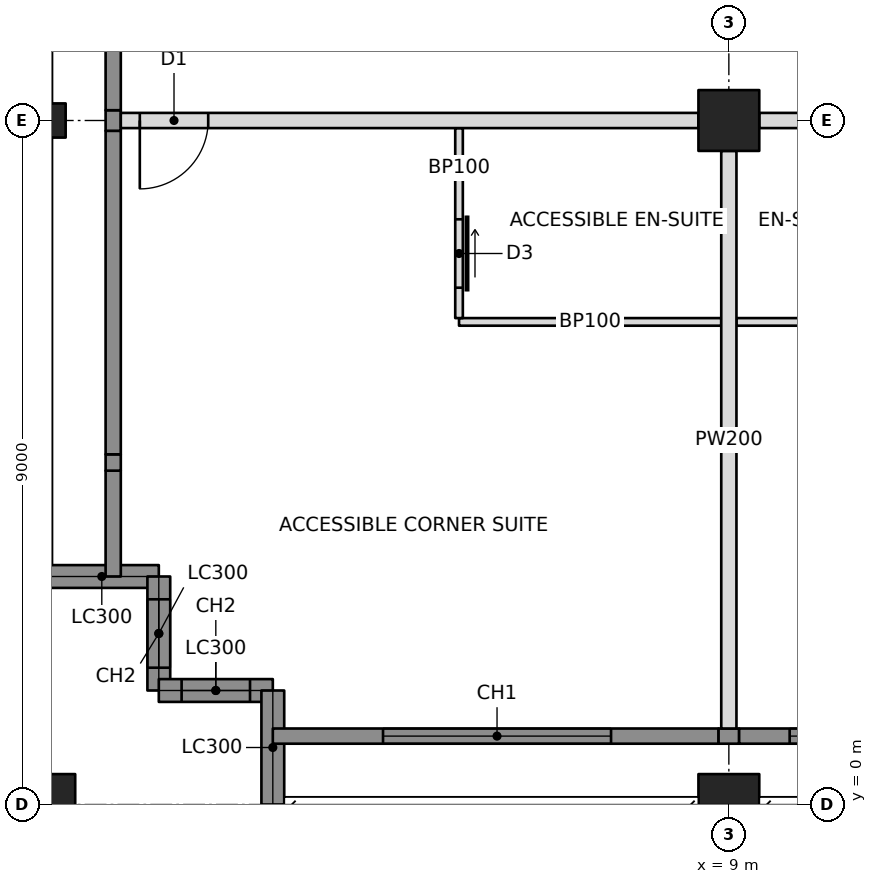
"""IFC4 building model, lengths in metres.
Left out: names, types, materials, properties, quantities, classifications, styles, units other than length and angle.
Written with IfcOpenShell. Run it as: python <this file> out.ifc"""

import sys

from ifc_helpers import new_model, si_unit, direction, frame, frame_2d, origin, origin_with_axes, origin_2d, place, context, subcontext, project, spatial, rectangle, hollow_rectangle, i_section, extrude, element, fill, save


model = new_model("IFC4")
c1 = context("Model", 3, precision=1e-05, world=origin(), true_north=direction((0.0, 1.0)))
c2 = subcontext(c1, "Body", "Model", "MODEL_VIEW")
j1 = project(units=[si_unit("LENGTHUNIT", "METRE"), si_unit("PLANEANGLEUNIT", "RADIAN")], contexts=[c1])
p1 = place(None, origin())
s1 = spatial("IfcSite", under=j1, at=p1, CompositionType="ELEMENT")
p2 = place(p1, origin())
s2 = spatial("IfcBuilding", under=s1, at=p2, CompositionType="ELEMENT")
p3 = place(p2, frame((0.0, 0.0, 191.0)))
s3 = spatial("IfcBuildingStorey", under=s2, at=p3, CompositionType="ELEMENT", Elevation=191.0)
p4 = place(p3, origin_with_axes())
e1 = element("IfcColumn", 1, at=p4, inside=s3, PredefinedType="COLUMN", context=c2, shape_type="SweptSolid", body=[
    extrude(hollow_rectangle(XDim=0.8, YDim=0.8, WallThickness=0.07, at=origin_2d()), origin(), (0.0, 0.0, 1.0), 3.4),
])
p5 = place(p3, frame((0.0, 9.0, 0.0), z_axis=(0.0, 0.0, 1.0), x_axis=(0.0, 1.0, 0.0)))
e2 = element("IfcColumn", 2, at=p5, inside=s3, PredefinedType="COLUMN", context=c2, shape_type="SweptSolid", body=[
    extrude(i_section(OverallWidth=0.449, OverallDepth=0.549, WebThickness=0.072, FlangeThickness=0.115, at=origin_2d()), origin(), (0.0, 0.0, 1.0), 3.4),
])
p6 = place(p3, frame((9.0, 0.0, 0.0), z_axis=(0.0, 0.0, 1.0), x_axis=(1.0, 0.0, 0.0)))
e3 = element("IfcColumn", 3, at=p6, inside=s3, PredefinedType="COLUMN", context=c2, shape_type="SweptSolid", body=[
    extrude(hollow_rectangle(XDim=0.8, YDim=0.8, WallThickness=0.07, at=origin_2d()), origin(), (0.0, 0.0, 1.0), 3.4),
])
p7 = place(p3, frame((9.0, 9.0, 0.0), z_axis=(0.0, 0.0, 1.0), x_axis=(1.0, 0.0, 0.0)))
e4 = element("IfcColumn", 4, at=p7, inside=s3, PredefinedType="COLUMN", context=c2, shape_type="SweptSolid", body=[
    extrude(hollow_rectangle(XDim=0.8, YDim=0.8, WallThickness=0.06, at=origin_2d()), origin(), (0.0, 0.0, 1.0), 3.4),
])
p8 = place(p3, frame((0.0, 3.0, 0.0), z_axis=(0.0, 0.0, 1.0), x_axis=(1.0, 0.0, 0.0)))
e5 = element("IfcWall", 5, at=p8, inside=s3, PredefinedType="SOLIDWALL", context=c2, shape_type="SweptSolid", body=[
    extrude(rectangle(XDim=1.5, YDim=0.3, at=frame_2d((0.75, 0.0))), origin(), (0.0, 0.0, 1.0), 2.42),
])
p9 = place(p3, frame((1.5, 3.0, 0.0), z_axis=(0.0, 0.0, 1.0), x_axis=(0.0, -1.0, 0.0)))
e6 = element("IfcWall", 6, at=p9, inside=s3, PredefinedType="SOLIDWALL", context=c2, shape_type="SweptSolid", body=[
    extrude(rectangle(XDim=1.5, YDim=0.3, at=frame_2d((0.75, 0.0))), origin(), (0.0, 0.0, 1.0), 3.2),
])
p10 = place(p9, frame((0.3, 0.0, 0.6)))
e7 = element("IfcOpeningElement", 7, at=p10, cuts=e6, PredefinedType="OPENING", context=c2, shape_type="SweptSolid", body=[
    extrude(rectangle(XDim=0.9, YDim=2.2, at=frame_2d((0.45, 1.1))), frame((0.0, 0.16, 0.0), z_axis=(0.0, -1.0, 0.0), x_axis=(1.0, 0.0, 0.0)), (0.0, 0.0, 1.0), 0.32),
])
p11 = place(p3, frame((1.5, 1.5, 0.0), z_axis=(0.0, 0.0, 1.0), x_axis=(1.0, 0.0, 0.0)))
e8 = element("IfcWall", 8, at=p11, inside=s3, PredefinedType="SOLIDWALL", context=c2, shape_type="SweptSolid", body=[
    extrude(rectangle(XDim=1.5, YDim=0.3, at=frame_2d((0.75, 0.0))), origin(), (0.0, 0.0, 1.0), 3.2),
])
p12 = place(p11, frame((0.3, 0.0, 0.6)))
e9 = element("IfcOpeningElement", 9, at=p12, cuts=e8, PredefinedType="OPENING", context=c2, shape_type="SweptSolid", body=[
    extrude(rectangle(XDim=0.9, YDim=2.2, at=frame_2d((0.45, 1.1))), frame((0.0, 0.16, 0.0), z_axis=(0.0, -1.0, 0.0), x_axis=(1.0, 0.0, 0.0)), (0.0, 0.0, 1.0), 0.32),
])
p13 = place(p3, frame((3.0, 1.5, 0.0), z_axis=(0.0, 0.0, 1.0), x_axis=(0.0, -1.0, 0.0)))
e10 = element("IfcWall", 10, at=p13, inside=s3, PredefinedType="SOLIDWALL", context=c2, shape_type="SweptSolid", body=[
    extrude(rectangle(XDim=1.5, YDim=0.3, at=frame_2d((0.75, 0.0))), origin(), (0.0, 0.0, 1.0), 2.42),
])
p14 = place(p3, frame((3.0, 0.9, 0.0), z_axis=(0.0, 0.0, 1.0), x_axis=(1.0, 0.0, 0.0)))
e11 = element("IfcWall", 11, at=p14, inside=s3, PredefinedType="SOLIDWALL", context=c2, shape_type="SweptSolid", body=[
    extrude(rectangle(XDim=5.865, YDim=0.2, at=frame_2d((2.932, 0.0))), origin(), (0.0, 0.0, 1.0), 3.2),
])
p15 = place(p14, frame((1.45, 0.0, 0.6)))
e12 = element("IfcOpeningElement", 12, at=p15, cuts=e11, PredefinedType="OPENING", context=c2, shape_type="SweptSolid", body=[
    extrude(rectangle(XDim=3.0, YDim=2.2, at=frame_2d((1.5, 1.1))), frame((0.0, 0.11, 0.0), z_axis=(0.0, -1.0, 0.0), x_axis=(1.0, 0.0, 0.0)), (0.0, 0.0, 1.0), 0.22),
])
p16 = place(p3, frame((0.9, 3.0, 0.0), z_axis=(0.0, 0.0, 1.0), x_axis=(0.0, 1.0, 0.0)))
e13 = element("IfcWall", 13, at=p16, inside=s3, PredefinedType="SOLIDWALL", context=c2, shape_type="SweptSolid", body=[
    extrude(rectangle(XDim=1.393, YDim=0.2, at=frame_2d((0.696, 0.0))), origin(), (0.0, 0.0, 1.0), 3.2),
])
p17 = place(p3, frame((1.0, 9.0, 0.0), z_axis=(0.0, 0.0, 1.0), x_axis=(1.0, 0.0, 0.0)))
e14 = element("IfcWall", 14, at=p17, inside=s3, PredefinedType="PARTITIONING", context=c2, shape_type="SweptSolid", body=[
    extrude(rectangle(XDim=7.6, YDim=0.2, at=frame_2d((3.8, 0.0))), origin(), (0.0, 0.0, 1.0), 2.438),
])
p18 = place(p17, frame((0.25, 0.0, 0.0)))
e15 = element("IfcOpeningElement", 15, at=p18, cuts=e14, PredefinedType="OPENING", context=c2, shape_type="SweptSolid", body=[
    extrude(rectangle(XDim=0.9, YDim=2.1, at=frame_2d((0.45, 1.05))), frame((0.0, 0.11, 0.0), z_axis=(0.0, -1.0, 0.0), x_axis=(1.0, 0.0, 0.0)), (0.0, 0.0, 1.0), 0.22),
])
p19 = place(p3, frame((9.4, 9.0, 0.0), z_axis=(0.0, 0.0, 1.0), x_axis=(1.0, 0.0, 0.0)))
e16 = element("IfcWall", 16, at=p19, inside=s3, PredefinedType="PARTITIONING", context=c2, shape_type="SweptSolid", body=[
    extrude(rectangle(XDim=8.2, YDim=0.2, at=frame_2d((4.1, 0.0))), origin(), (0.0, 0.0, 1.0), 2.405),
])
p20 = place(p19, frame((2.95, 0.0, 0.0)))
e17 = element("IfcOpeningElement", 17, at=p20, cuts=e16, PredefinedType="OPENING", context=c2, shape_type="SweptSolid", body=[
    extrude(rectangle(XDim=0.9, YDim=2.1, at=frame_2d((0.45, 1.05))), frame((0.0, 0.11, 0.0), z_axis=(0.0, -1.0, 0.0), x_axis=(1.0, 0.0, 0.0)), (0.0, 0.0, 1.0), 0.22),
])
p21 = place(p19, frame((4.35, 0.0, 0.0)))
e18 = element("IfcOpeningElement", 18, at=p21, cuts=e16, PredefinedType="OPENING", context=c2, shape_type="SweptSolid", body=[
    extrude(rectangle(XDim=0.9, YDim=2.1, at=frame_2d((0.45, 1.05))), frame((0.0, 0.11, 0.0), z_axis=(0.0, -1.0, 0.0), x_axis=(1.0, 0.0, 0.0)), (0.0, 0.0, 1.0), 0.22),
])
p22 = place(p3, frame((9.0, 8.6, 0.0), z_axis=(0.0, 0.0, 1.0), x_axis=(0.0, -1.0, 0.0)))
e19 = element("IfcWall", 19, at=p22, inside=s3, PredefinedType="PARTITIONING", context=c2, shape_type="SweptSolid", body=[
    extrude(rectangle(XDim=7.6, YDim=0.2, at=frame_2d((3.8, 0.0))), origin(), (0.0, 0.0, 1.0), 2.438),
])
p23 = place(p3, frame((5.45, 6.35, 0.0), z_axis=(0.0, 0.0, 1.0), x_axis=(1.0, 0.0, 0.0)))
e20 = element("IfcWall", 20, at=p23, inside=s3, PredefinedType="PARTITIONING", context=c2, shape_type="SweptSolid", body=[
    extrude(rectangle(XDim=3.45, YDim=0.1, at=frame_2d((1.725, 0.0))), origin(), (0.0, 0.0, 1.0), 2.438),
])
p24 = place(p3, frame((5.45, 8.9, 0.0), z_axis=(0.0, 0.0, 1.0), x_axis=(0.0, -1.0, 0.0)))
e21 = element("IfcWall", 21, at=p24, inside=s3, PredefinedType="PARTITIONING", context=c2, shape_type="SweptSolid", body=[
    extrude(rectangle(XDim=2.5, YDim=0.1, at=frame_2d((1.25, 0.0))), origin(), (0.0, 0.0, 1.0), 2.438),
])
p25 = place(p24, frame((1.2, 0.0, 0.0)))
e22 = element("IfcOpeningElement", 22, at=p25, cuts=e21, PredefinedType="OPENING", context=c2, shape_type="SweptSolid", body=[
    extrude(rectangle(XDim=0.9, YDim=2.1, at=frame_2d((0.45, 1.05))), frame((0.0, 0.06, 0.0), z_axis=(0.0, -1.0, 0.0), x_axis=(1.0, 0.0, 0.0)), (0.0, 0.0, 1.0), 0.12),
])
p26 = place(p3, frame((9.1, 6.35, 0.0), z_axis=(0.0, 0.0, 1.0), x_axis=(1.0, 0.0, 0.0)))
e23 = element("IfcWall", 23, at=p26, inside=s3, PredefinedType="PARTITIONING", context=c2, shape_type="SweptSolid", body=[
    extrude(rectangle(XDim=2.95, YDim=0.1, at=frame_2d((1.475, 0.0))), origin(), (0.0, 0.0, 1.0), 2.438),
])
p27 = place(p3, frame((8.865, 0.9, 0.0), z_axis=(0.0, 0.0, 1.0), x_axis=(1.0, 0.0, 0.0)))
e24 = element("IfcWall", 24, at=p27, inside=s3, PredefinedType="SOLIDWALL", context=c2, shape_type="SweptSolid", body=[
    extrude(rectangle(XDim=0.271, YDim=0.2, at=frame_2d((0.135, 0.0))), origin(), (0.0, 0.0, 1.0), 2.438),
])
p28 = place(p3, frame((9.135, 0.9, 0.0), z_axis=(0.0, 0.0, 1.0), x_axis=(1.0, 0.0, 0.0)))
e25 = element("IfcWall", 25, at=p28, inside=s3, PredefinedType="SOLIDWALL", context=c2, shape_type="SweptSolid", body=[
    extrude(rectangle(XDim=8.671, YDim=0.2, at=frame_2d((4.335, 0.0))), origin(), (0.0, 0.0, 1.0), 3.2),
])
p29 = place(p28, frame((0.665, 0.0, 0.6)))
e26 = element("IfcOpeningElement", 26, at=p29, cuts=e25, PredefinedType="OPENING", context=c2, shape_type="SweptSolid", body=[
    extrude(rectangle(XDim=3.0, YDim=2.2, at=frame_2d((1.5, 1.1))), frame((0.0, 0.11, 0.0), z_axis=(0.0, -1.0, 0.0), x_axis=(1.0, 0.0, 0.0)), (0.0, 0.0, 1.0), 0.22),
])
p30 = place(p28, frame((5.065, 0.0, 0.6)))
e27 = element("IfcOpeningElement", 27, at=p30, cuts=e25, PredefinedType="OPENING", context=c2, shape_type="SweptSolid", body=[
    extrude(rectangle(XDim=3.0, YDim=2.2, at=frame_2d((1.5, 1.1))), frame((0.0, 0.11, 0.0), z_axis=(0.0, -1.0, 0.0), x_axis=(1.0, 0.0, 0.0)), (0.0, 0.0, 1.0), 0.22),
])
p31 = place(p3, frame((0.9, 4.393, 0.0), z_axis=(0.0, 0.0, 1.0), x_axis=(0.0, 1.0, 0.0)))
e28 = element("IfcWall", 28, at=p31, inside=s3, PredefinedType="SOLIDWALL", context=c2, shape_type="SweptSolid", body=[
    extrude(rectangle(XDim=0.215, YDim=0.2, at=frame_2d((0.107, 0.0))), origin(), (0.0, 0.0, 1.0), 2.661),
])
p32 = place(p3, frame((0.9, 4.607, 0.0), z_axis=(0.0, 0.0, 1.0), x_axis=(0.0, 1.0, 0.0)))
e29 = element("IfcWall", 29, at=p32, inside=s3, PredefinedType="SOLIDWALL", context=c2, shape_type="SweptSolid", body=[
    extrude(rectangle(XDim=4.257, YDim=0.2, at=frame_2d((2.129, 0.0))), origin(), (0.0, 0.0, 1.0), 3.2),
])
p33 = place(p3, frame((0.9, 8.865, 0.0), z_axis=(0.0, 0.0, 1.0), x_axis=(0.0, 1.0, 0.0)))
e30 = element("IfcWall", 30, at=p33, inside=s3, PredefinedType="SOLIDWALL", context=c2, shape_type="SweptSolid", body=[
    extrude(rectangle(XDim=0.271, YDim=0.2, at=frame_2d((0.135, 0.0))), origin(), (0.0, 0.0, 1.0), 2.438),
])
p34 = place(p3, frame((0.9, 9.135, 0.0), z_axis=(0.0, 0.0, 1.0), x_axis=(0.0, 1.0, 0.0)))
e31 = element("IfcWall", 31, at=p34, inside=s3, PredefinedType="SOLIDWALL", context=c2, shape_type="SweptSolid", body=[
    extrude(rectangle(XDim=8.671, YDim=0.2, at=frame_2d((4.335, 0.0))), origin(), (0.0, 0.0, 1.0), 3.2),
])
p35 = place(p34, frame((2.015, 0.0, 0.6)))
e32 = element("IfcOpeningElement", 32, at=p35, cuts=e31, PredefinedType="OPENING", context=c2, shape_type="SweptSolid", body=[
    extrude(rectangle(XDim=3.0, YDim=2.2, at=frame_2d((1.5, 1.1))), frame((0.0, 0.11, 0.0), z_axis=(0.0, -1.0, 0.0), x_axis=(1.0, 0.0, 0.0)), (0.0, 0.0, 1.0), 0.22),
])
p36 = place(p34, frame((5.515, 0.0, 0.6)))
e33 = element("IfcOpeningElement", 33, at=p36, cuts=e31, PredefinedType="OPENING", context=c2, shape_type="SweptSolid", body=[
    extrude(rectangle(XDim=3.0, YDim=2.2, at=frame_2d((1.5, 1.1))), frame((0.0, 0.11, 0.0), z_axis=(0.0, -1.0, 0.0), x_axis=(1.0, 0.0, 0.0)), (0.0, 0.0, 1.0), 0.22),
])
p37 = place(p10, origin())
e34 = element("IfcWindow", 34, at=p37, inside=s3, PartitioningType="SINGLE_PANEL", PredefinedType="WINDOW", context=c2, shape_type="SweptSolid", body=[
    extrude(rectangle(XDim=0.9, YDim=2.2, at=frame_2d((0.45, 1.1))), frame((0.0, 0.03, 0.0), z_axis=(0.0, -1.0, 0.0), x_axis=(1.0, 0.0, 0.0)), (0.0, 0.0, 1.0), 0.06),
])
fill(e7, e34)
p38 = place(p12, origin())
e35 = element("IfcWindow", 35, at=p38, inside=s3, PartitioningType="SINGLE_PANEL", PredefinedType="WINDOW", context=c2, shape_type="SweptSolid", body=[
    extrude(rectangle(XDim=0.9, YDim=2.2, at=frame_2d((0.45, 1.1))), frame((0.0, 0.03, 0.0), z_axis=(0.0, -1.0, 0.0), x_axis=(1.0, 0.0, 0.0)), (0.0, 0.0, 1.0), 0.06),
])
fill(e9, e35)
p39 = place(p15, origin())
e36 = element("IfcWindow", 36, at=p39, inside=s3, PartitioningType="TRIPLE_PANEL_VERTICAL", PredefinedType="WINDOW", context=c2, shape_type="SweptSolid", body=[
    extrude(rectangle(XDim=3.0, YDim=2.2, at=frame_2d((1.5, 1.1))), frame((0.0, 0.03, 0.0), z_axis=(0.0, -1.0, 0.0), x_axis=(1.0, 0.0, 0.0)), (0.0, 0.0, 1.0), 0.06),
])
fill(e12, e36)
p40 = place(p29, origin())
e37 = element("IfcWindow", 37, at=p40, inside=s3, PartitioningType="TRIPLE_PANEL_VERTICAL", PredefinedType="WINDOW", context=c2, shape_type="SweptSolid", body=[
    extrude(rectangle(XDim=3.0, YDim=2.2, at=frame_2d((1.5, 1.1))), frame((0.0, 0.03, 0.0), z_axis=(0.0, -1.0, 0.0), x_axis=(1.0, 0.0, 0.0)), (0.0, 0.0, 1.0), 0.06),
])
fill(e26, e37)
p41 = place(p25, origin())
e38 = element("IfcDoor", 38, at=p41, inside=s3, OperationType="SLIDING_TO_LEFT", PredefinedType="DOOR", context=c2, shape_type="SweptSolid", body=[
    extrude(rectangle(XDim=0.9, YDim=2.1, at=frame_2d((0.45, 1.05))), frame((0.0, 0.025, 0.0), z_axis=(0.0, -1.0, 0.0), x_axis=(1.0, 0.0, 0.0)), (0.0, 0.0, 1.0), 0.05),
])
fill(e22, e38)
p42 = place(p18, frame((0.9, 0.0, 0.0), z_axis=(0.0, 0.0, 1.0), x_axis=(-1.0, 0.0, 0.0)))
e39 = element("IfcDoor", 39, at=p42, inside=s3, OperationType="SINGLE_SWING_RIGHT", PredefinedType="DOOR", context=c2, shape_type="SweptSolid", body=[
    extrude(rectangle(XDim=0.9, YDim=2.1, at=frame_2d((0.45, 1.05))), frame((0.0, 0.025, 0.0), z_axis=(0.0, -1.0, 0.0), x_axis=(1.0, 0.0, 0.0)), (0.0, 0.0, 1.0), 0.05),
])
fill(e15, e39)
save(model, sys.argv[1])
